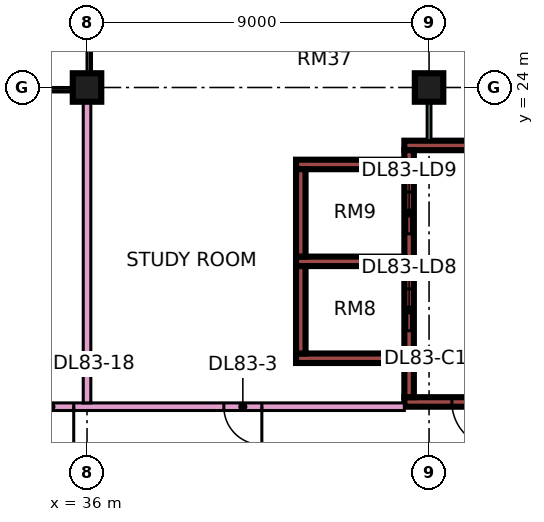
"""IFC4 building model, lengths in metres.
Left out: names, types, materials, properties, quantities, classifications, styles, units other than length and angle.
Written with IfcOpenShell. Run it as: python <this file> out.ifc"""

import sys

from ifc_helpers import new_model, si_unit, direction, frame, frame_2d, origin, origin_2d, place, context, subcontext, project, spatial, rectangle, extrude, element, fill, save


model = new_model("IFC4")
c1 = context("Model", 3, precision=1e-05, world=origin(), true_north=direction((0.0, 1.0)))
c2 = subcontext(c1, "Body", "Model", "MODEL_VIEW")
j1 = project(units=[si_unit("LENGTHUNIT", "METRE"), si_unit("PLANEANGLEUNIT", "RADIAN")], contexts=[c1])
p1 = place(None, origin())
s1 = spatial("IfcSite", under=j1, at=p1, CompositionType="ELEMENT")
p2 = place(p1, origin())
s2 = spatial("IfcBuilding", under=s1, at=p2, CompositionType="ELEMENT")
p3 = place(p2, frame((0.0, 0.0, 357.65)))
s3 = spatial("IfcBuildingStorey", under=s2, at=p3, CompositionType="ELEMENT", Elevation=357.65)
for number, where, z_axis, x_axis in (
    (1, (36.0, 24.0, 0.0), (0.0, 0.0, 1.0), (1.0, 0.0, 0.0)),
    (2, (45.0, 24.0, 0.0), (0.0, 0.0, 1.0), (1.0, 0.0, 0.0)),
):
    element("IfcColumn", number, at=place(p3, frame(where, z_axis=z_axis, x_axis=x_axis)), inside=s3, PredefinedType="COLUMN", context=c2, shape_type="SweptSolid", body=[
        extrude(rectangle(XDim=0.75, YDim=0.75, at=origin_2d()), origin(), (0.0, 0.0, 1.0), 3.75),
    ])
p4 = place(p3, frame((44.35, 15.725, 0.0), z_axis=(0.0, 0.0, 1.0), x_axis=(1.0, 0.0, 0.0)))
e3 = element("IfcWall", 3, at=p4, inside=s3, PredefinedType="SHEAR", context=c2, shape_type="SweptSolid", body=[
    extrude(rectangle(XDim=3.425, YDim=0.25, at=frame_2d((1.712, 0.0))), origin(), (0.0, 0.0, 1.0), 3.75),
])
p5 = place(p4, frame((1.25, 0.0, 0.0)))
e4 = element("IfcOpeningElement", 4, at=p5, cuts=e3, PredefinedType="OPENING", context=c2, shape_type="SweptSolid", body=[
    extrude(rectangle(XDim=1.2, YDim=2.2, at=frame_2d((0.6, 1.1))), frame((0.0, 0.135, 0.0), z_axis=(0.0, -1.0, 0.0), x_axis=(1.0, 0.0, 0.0)), (0.0, 0.0, 1.0), 0.27),
])
p6 = place(p3, frame((44.35, 22.475, 0.0), z_axis=(0.0, 0.0, 1.0), x_axis=(1.0, 0.0, 0.0)))
e5 = element("IfcWall", 5, at=p6, inside=s3, PredefinedType="SHEAR", context=c2, shape_type="SweptSolid", body=[
    extrude(rectangle(XDim=3.425, YDim=0.25, at=frame_2d((1.712, 0.0))), origin(), (0.0, 0.0, 1.0), 3.75),
])
p7 = place(p3, frame((44.475, 15.85, 0.0), z_axis=(0.0, 0.0, 1.0), x_axis=(0.0, 1.0, 0.0)))
e6 = element("IfcWall", 6, at=p7, inside=s3, PredefinedType="SHEAR", context=c2, shape_type="SweptSolid", body=[
    extrude(rectangle(XDim=6.5, YDim=0.25, at=frame_2d((3.25, 0.0))), origin(), (0.0, 0.0, 1.0), 3.75),
])
p8 = place(p7, frame((1.75, 0.0, 0.0)))
e7 = element("IfcOpeningElement", 7, at=p8, cuts=e6, PredefinedType="OPENING", context=c2, shape_type="SweptSolid", body=[
    extrude(rectangle(XDim=1.1, YDim=2.2, at=frame_2d((0.55, 1.1))), frame((0.0, 0.135, 0.0), z_axis=(0.0, -1.0, 0.0), x_axis=(1.0, 0.0, 0.0)), (0.0, 0.0, 1.0), 0.27),
])
p9 = place(p7, frame((4.3, 0.0, 0.0)))
e8 = element("IfcOpeningElement", 8, at=p9, cuts=e6, PredefinedType="OPENING", context=c2, shape_type="SweptSolid", body=[
    extrude(rectangle(XDim=1.1, YDim=2.2, at=frame_2d((0.55, 1.1))), frame((0.0, 0.135, 0.0), z_axis=(0.0, -1.0, 0.0), x_axis=(1.0, 0.0, 0.0)), (0.0, 0.0, 1.0), 0.27),
])
for number, where, z_axis, x_axis in (
    (9, (41.5, 16.875, 0.0), (0.0, 0.0, 1.0), (1.0, 0.0, 0.0)),
    (10, (41.5, 19.425, 0.0), (0.0, 0.0, 1.0), (1.0, 0.0, 0.0)),
    (11, (41.5, 21.975, 0.0), (0.0, 0.0, 1.0), (1.0, 0.0, 0.0)),
):
    element("IfcWall", number, at=place(p3, frame(where, z_axis=z_axis, x_axis=x_axis)), inside=s3, PredefinedType="SHEAR", context=c2, shape_type="SweptSolid", body=[
        extrude(rectangle(XDim=2.85, YDim=0.25, at=frame_2d((1.425, 0.0))), origin(), (0.0, 0.0, 1.0), 3.75),
    ])
for number, where, z_axis, x_axis in (
    (12, (41.625, 17.0, 0.0), (0.0, 0.0, 1.0), (0.0, 1.0, 0.0)),
    (13, (41.625, 19.55, 0.0), (0.0, 0.0, 1.0), (0.0, 1.0, 0.0)),
):
    element("IfcWall", number, at=place(p3, frame(where, z_axis=z_axis, x_axis=x_axis)), inside=s3, PredefinedType="SHEAR", context=c2, shape_type="SweptSolid", body=[
        extrude(rectangle(XDim=2.3, YDim=0.25, at=frame_2d((1.15, 0.0))), origin(), (0.0, 0.0, 1.0), 3.75),
    ])
p10 = place(p3, frame((34.0, 15.6, 0.0), z_axis=(0.0, 0.0, 1.0), x_axis=(1.0, 0.0, 0.0)))
e14 = element("IfcWall", 14, at=p10, inside=s3, PredefinedType="PARTITIONING", context=c2, shape_type="SweptSolid", body=[
    extrude(rectangle(XDim=10.35, YDim=0.2, at=frame_2d((5.175, 0.0))), origin(), (0.0, 0.0, 1.0), 3.35),
])
p11 = place(p10, frame((5.6, 0.0, 0.0)))
e15 = element("IfcOpeningElement", 15, at=p11, cuts=e14, PredefinedType="OPENING", context=c2, shape_type="SweptSolid", body=[
    extrude(rectangle(XDim=1.0, YDim=2.1, at=frame_2d((0.5, 1.05))), frame((0.0, 0.11, 0.0), z_axis=(0.0, -1.0, 0.0), x_axis=(1.0, 0.0, 0.0)), (0.0, 0.0, 1.0), 0.22),
])
p12 = place(p10, frame((0.45, 0.0, 0.0)))
e16 = element("IfcOpeningElement", 16, at=p12, cuts=e14, PredefinedType="OPENING", context=c2, shape_type="SweptSolid", body=[
    extrude(rectangle(XDim=1.2, YDim=2.1, at=frame_2d((0.6, 1.05))), frame((0.0, 0.11, 0.0), z_axis=(0.0, -1.0, 0.0), x_axis=(1.0, 0.0, 0.0)), (0.0, 0.0, 1.0), 0.22),
])
p13 = place(p3, frame((36.0, 15.7, 0.0), z_axis=(0.0, 0.0, 1.0), x_axis=(0.0, 1.0, 0.0)))
e17 = element("IfcWall", 17, at=p13, inside=s3, PredefinedType="PARTITIONING", context=c2, shape_type="SweptSolid", body=[
    extrude(rectangle(XDim=8.3, YDim=0.2, at=frame_2d((4.15, 0.0))), origin(), (0.0, 0.0, 1.0), 3.35),
])
p14 = place(p3, frame((45.0, 22.6, 0.0), z_axis=(0.0, 0.0, 1.0), x_axis=(0.0, 1.0, 0.0)))
e18 = element("IfcWall", 18, at=p14, inside=s3, PredefinedType="PARTITIONING", context=c2, shape_type="SweptSolid", body=[
    extrude(rectangle(XDim=1.4, YDim=0.1, at=frame_2d((0.7, 0.0))), origin(), (0.0, 0.0, 1.0), 3.35),
])
p15 = place(p5, origin())
e19 = element("IfcDoor", 19, at=p15, inside=s3, OperationType="SINGLE_SWING_RIGHT", PredefinedType="DOOR", context=c2, shape_type="SweptSolid", body=[
    extrude(rectangle(XDim=1.2, YDim=2.2, at=frame_2d((0.6, 1.1))), frame((0.0, 0.025, 0.0), z_axis=(0.0, -1.0, 0.0), x_axis=(1.0, 0.0, 0.0)), (0.0, 0.0, 1.0), 0.05),
])
fill(e4, e19)
p16 = place(p8, origin())
e20 = element("IfcDoor", 20, at=p16, inside=s3, OperationType="DOUBLE_DOOR_SLIDING", PredefinedType="DOOR", context=c2, shape_type="SweptSolid", body=[
    extrude(rectangle(XDim=1.1, YDim=2.2, at=frame_2d((0.55, 1.1))), frame((0.0, 0.025, 0.0), z_axis=(0.0, -1.0, 0.0), x_axis=(1.0, 0.0, 0.0)), (0.0, 0.0, 1.0), 0.05),
])
fill(e7, e20)
p17 = place(p9, origin())
e21 = element("IfcDoor", 21, at=p17, inside=s3, OperationType="DOUBLE_DOOR_SLIDING", PredefinedType="DOOR", context=c2, shape_type="SweptSolid", body=[
    extrude(rectangle(XDim=1.1, YDim=2.2, at=frame_2d((0.55, 1.1))), frame((0.0, 0.025, 0.0), z_axis=(0.0, -1.0, 0.0), x_axis=(1.0, 0.0, 0.0)), (0.0, 0.0, 1.0), 0.05),
])
fill(e8, e21)
p18 = place(p11, origin())
e22 = element("IfcDoor", 22, at=p18, inside=s3, OperationType="SINGLE_SWING_RIGHT", PredefinedType="DOOR", context=c2, shape_type="SweptSolid", body=[
    extrude(rectangle(XDim=1.0, YDim=2.1, at=frame_2d((0.5, 1.05))), frame((0.0, 0.025, 0.0), z_axis=(0.0, -1.0, 0.0), x_axis=(1.0, 0.0, 0.0)), (0.0, 0.0, 1.0), 0.05),
])
fill(e15, e22)
p19 = place(p12, origin())
e23 = element("IfcDoor", 23, at=p19, inside=s3, OperationType="SINGLE_SWING_RIGHT", PredefinedType="DOOR", context=c2, shape_type="SweptSolid", body=[
    extrude(rectangle(XDim=1.2, YDim=2.1, at=frame_2d((0.6, 1.05))), frame((0.0, 0.025, 0.0), z_axis=(0.0, -1.0, 0.0), x_axis=(1.0, 0.0, 0.0)), (0.0, 0.0, 1.0), 0.05),
])
fill(e16, e23)
save(model, sys.argv[1])
